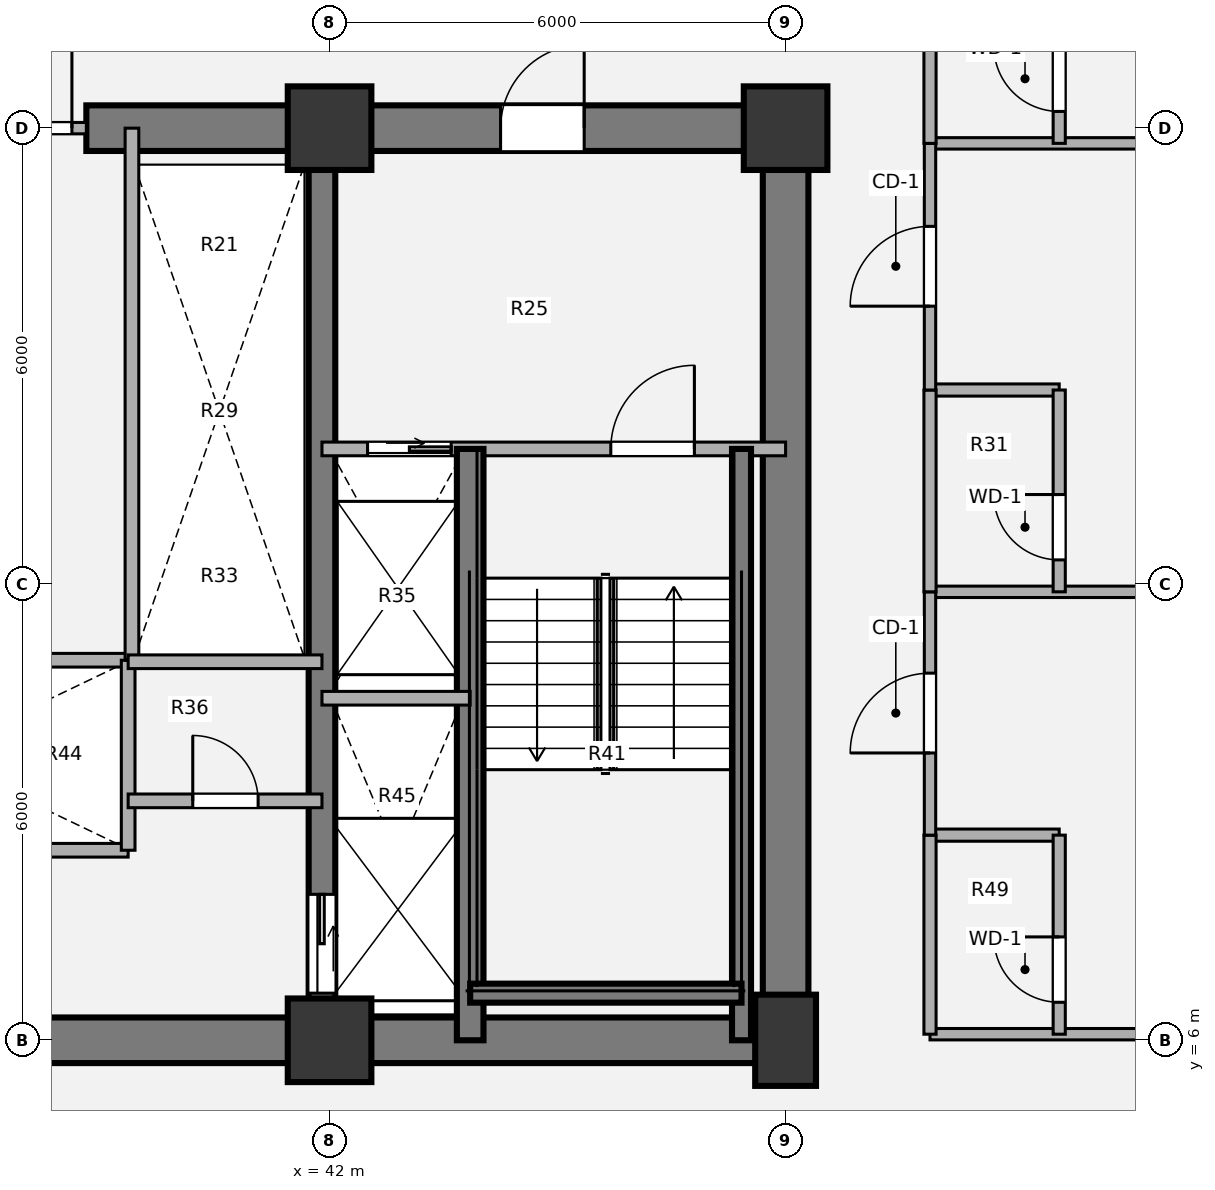
"""IFC4 building model, lengths in metres.
Left out: names, types, materials, properties, quantities, classifications, styles, units other than length and angle.
Written with IfcOpenShell. Run it as: python <this file> out.ifc"""

import sys

from ifc_helpers import new_model, si_unit, direction, frame, frame_2d, origin, origin_2d, place, context, subcontext, project, spatial, rectangle, extrude, source, transform, mapped, element, fill, save


model = new_model("IFC4")
c1 = context("Model", 3, precision=1e-05, world=origin(), true_north=direction((0.0, 1.0)))
c2 = subcontext(c1, "Body", "Model", "MODEL_VIEW")
j1 = project(units=[si_unit("LENGTHUNIT", "METRE"), si_unit("PLANEANGLEUNIT", "RADIAN")], contexts=[c1])
p1 = place(None, origin())
s1 = spatial("IfcSite", under=j1, at=p1, CompositionType="ELEMENT")
p2 = place(p1, origin())
s2 = spatial("IfcBuilding", under=s1, at=p2, CompositionType="ELEMENT")
p3 = place(p2, frame((0.0, 0.0, 42.12)))
s3 = spatial("IfcBuildingStorey", under=s2, at=p3, CompositionType="ELEMENT", Elevation=42.12)
m1 = source(origin(), c2, "Body", "SweptSolid", [
    extrude(rectangle(XDim=1.1, YDim=1.1, at=origin_2d()), origin(), (0.0, 0.0, 1.0), 3.78),
])
p4 = place(p3, frame((42.0, 6.0, 0.0), z_axis=(0.0, 0.0, 1.0), x_axis=(1.0, 0.0, 0.0)))
e1 = element("IfcColumn", 1, at=p4, inside=s3, PredefinedType="COLUMN", context=c2, shape_type="MappedRepresentation", body=[
    mapped(m1, transform((0.0, 0.0, 0.0), x_axis=(1.0, 0.0, 0.0), y_axis=(0.0, 1.0, 0.0), z_axis=(0.0, 0.0, 1.0), scale=1.0)),
])
m2 = source(origin(), c2, "Body", "SweptSolid", [
    extrude(rectangle(XDim=0.8, YDim=1.2, at=origin_2d()), origin(), (0.0, 0.0, 1.0), 3.78),
])
p5 = place(p3, frame((48.0, 6.0, 0.0), z_axis=(0.0, 0.0, 1.0), x_axis=(1.0, 0.0, 0.0)))
e2 = element("IfcColumn", 2, at=p5, inside=s3, PredefinedType="COLUMN", context=c2, shape_type="MappedRepresentation", body=[
    mapped(m2, transform((0.0, 0.0, 0.0), x_axis=(1.0, 0.0, 0.0), y_axis=(0.0, 1.0, 0.0), z_axis=(0.0, 0.0, 1.0), scale=1.0)),
])
for number, where, z_axis, x_axis in (
    (3, (42.0, 18.0, 0.0), (0.0, 0.0, 1.0), (1.0, 0.0, 0.0)),
    (4, (48.0, 18.0, 0.0), (0.0, 0.0, 1.0), (1.0, 0.0, 0.0)),
):
    element("IfcColumn", number, at=place(p3, frame(where, z_axis=z_axis, x_axis=x_axis)), inside=s3, PredefinedType="COLUMN", context=c2, shape_type="MappedRepresentation", body=[
        mapped(m1, transform((0.0, 0.0, 0.0), x_axis=(1.0, 0.0, 0.0), y_axis=(0.0, 1.0, 0.0), z_axis=(0.0, 0.0, 1.0), scale=1.0)),
    ])
p6 = place(p3, frame((48.3, 6.0, 0.0), z_axis=(0.0, 0.0, 1.0), x_axis=(-1.0, 0.0, 0.0)))
e5 = element("IfcWall", 5, at=p6, inside=s3, PredefinedType="SHEAR", context=c2, shape_type="SweptSolid", body=[
    extrude(rectangle(XDim=24.6, YDim=0.6, at=frame_2d((12.3, 0.0))), origin(), (0.0, 0.0, 1.0), 3.78),
])
p7 = place(p3, frame((48.0, 18.0, 0.0), z_axis=(0.0, 0.0, 1.0), x_axis=(0.0, -1.0, 0.0)))
e6 = element("IfcWall", 6, at=p7, inside=s3, PredefinedType="SHEAR", context=c2, shape_type="SweptSolid", body=[
    extrude(rectangle(XDim=12.0, YDim=0.6, at=frame_2d((6.0, 0.0))), origin(), (0.0, 0.0, 1.0), 3.78),
])
p8 = place(p3, frame((38.8, 18.0, 0.0), z_axis=(0.0, 0.0, 1.0), x_axis=(1.0, 0.0, 0.0)))
e7 = element("IfcWall", 7, at=p8, inside=s3, PredefinedType="SHEAR", context=c2, shape_type="SweptSolid", body=[
    extrude(rectangle(XDim=9.5, YDim=0.6, at=frame_2d((4.75, 0.0))), origin(), (0.0, 0.0, 1.0), 3.78),
])
p9 = place(p8, frame((5.45, 0.0, 0.0)))
e8 = element("IfcOpeningElement", 8, at=p9, cuts=e7, PredefinedType="OPENING", context=c2, shape_type="SweptSolid", body=[
    extrude(rectangle(XDim=1.1, YDim=2.1, at=origin_2d()), frame((0.55, 0.31, 1.05), z_axis=(0.0, -1.0, 0.0), x_axis=(1.0, 0.0, 0.0)), (0.0, 0.0, 1.0), 0.62),
])
p10 = place(p3, frame((41.9, 18.0, 0.0), z_axis=(0.0, 0.0, 1.0), x_axis=(0.0, -1.0, 0.0)))
e9 = element("IfcWall", 9, at=p10, inside=s3, PredefinedType="SHEAR", context=c2, shape_type="SweptSolid", body=[
    extrude(rectangle(XDim=12.0, YDim=0.35, at=frame_2d((6.0, 0.0))), origin(), (0.0, 0.0, 1.0), 3.78),
])
p11 = place(p10, frame((10.08, 0.0, 0.0)))
e10 = element("IfcOpeningElement", 10, at=p11, cuts=e9, PredefinedType="OPENING", context=c2, shape_type="SweptSolid", body=[
    extrude(rectangle(XDim=1.3, YDim=2.1, at=origin_2d()), frame((0.65, 0.185, 1.05), z_axis=(0.0, -1.0, 0.0), x_axis=(1.0, 0.0, 0.0)), (0.0, 0.0, 1.0), 0.37),
])
for number, where, z_axis, x_axis in (
    (11, (34.2, 11.0, 0.0), (0.0, 0.0, 1.0), (1.0, 0.0, 0.0)),
    (12, (34.2, 8.5, 0.0), (0.0, 0.0, 1.0), (1.0, 0.0, 0.0)),
):
    element("IfcWall", number, at=place(p3, frame(where, z_axis=z_axis, x_axis=x_axis)), inside=s3, PredefinedType="PARTITIONING", context=c2, shape_type="SweptSolid", body=[
        extrude(rectangle(XDim=5.15, YDim=0.18, at=frame_2d((2.575, 0.0))), origin(), (0.0, 0.0, 1.0), 3.5),
    ])
p12 = place(p3, frame((39.35, 8.5, 0.0), z_axis=(0.0, 0.0, 1.0), x_axis=(0.0, 1.0, 0.0)))
e13 = element("IfcWall", 13, at=p12, inside=s3, PredefinedType="PARTITIONING", context=c2, shape_type="SweptSolid", body=[
    extrude(rectangle(XDim=2.5, YDim=0.18, at=frame_2d((1.25, 0.0))), origin(), (0.0, 0.0, 1.0), 3.5),
])
p13 = place(p3, frame((39.4, 11.0, 0.0), z_axis=(0.0, 0.0, 1.0), x_axis=(0.0, 1.0, 0.0)))
e14 = element("IfcWall", 14, at=p13, inside=s3, PredefinedType="PARTITIONING", context=c2, shape_type="SweptSolid", body=[
    extrude(rectangle(XDim=7.0, YDim=0.18, at=frame_2d((3.5, 0.0))), origin(), (0.0, 0.0, 1.0), 3.5),
])
p14 = place(p3, frame((39.35, 10.98, 0.0), z_axis=(0.0, 0.0, 1.0), x_axis=(1.0, 0.0, 0.0)))
e15 = element("IfcWall", 15, at=p14, inside=s3, PredefinedType="PARTITIONING", context=c2, shape_type="SweptSolid", body=[
    extrude(rectangle(XDim=2.55, YDim=0.18, at=frame_2d((1.275, 0.0))), origin(), (0.0, 0.0, 1.0), 3.5),
])
p15 = place(p3, frame((39.35, 9.15, 0.0), z_axis=(0.0, 0.0, 1.0), x_axis=(1.0, 0.0, 0.0)))
e16 = element("IfcWall", 16, at=p15, inside=s3, PredefinedType="PARTITIONING", context=c2, shape_type="SweptSolid", body=[
    extrude(rectangle(XDim=2.55, YDim=0.18, at=frame_2d((1.275, 0.0))), origin(), (0.0, 0.0, 1.0), 3.5),
])
p16 = place(p15, frame((0.85, 0.0, 0.0)))
e17 = element("IfcOpeningElement", 17, at=p16, cuts=e16, PredefinedType="OPENING", context=c2, shape_type="SweptSolid", body=[
    extrude(rectangle(XDim=0.86, YDim=2.1, at=origin_2d()), frame((0.43, 0.1, 1.05), z_axis=(0.0, -1.0, 0.0), x_axis=(1.0, 0.0, 0.0)), (0.0, 0.0, 1.0), 0.2),
])
p17 = place(p3, frame((33.2, 18.0, 0.0), z_axis=(0.0, 0.0, 1.0), x_axis=(1.0, 0.0, 0.0)))
e18 = element("IfcWall", 18, at=p17, inside=s3, PredefinedType="PARTITIONING", context=c2, shape_type="SweptSolid", body=[
    extrude(rectangle(XDim=5.6, YDim=0.15, at=frame_2d((2.8, 0.0))), origin(), (0.0, 0.0, 1.0), 2.315),
])
p18 = place(p17, frame((0.19, 0.0, 0.0)))
e19 = element("IfcOpeningElement", 19, at=p18, cuts=e18, PredefinedType="OPENING", context=c2, shape_type="SweptSolid", body=[
    extrude(rectangle(XDim=1.1, YDim=2.1, at=origin_2d()), frame((0.55, 0.085, 1.05), z_axis=(0.0, -1.0, 0.0), x_axis=(1.0, 0.0, 0.0)), (0.0, 0.0, 1.0), 0.17),
])
p19 = place(p17, frame((4.31, 0.0, 0.0)))
e20 = element("IfcOpeningElement", 20, at=p19, cuts=e18, PredefinedType="OPENING", context=c2, shape_type="SweptSolid", body=[
    extrude(rectangle(XDim=1.1, YDim=2.1, at=origin_2d()), frame((0.55, 0.085, 1.05), z_axis=(0.0, -1.0, 0.0), x_axis=(1.0, 0.0, 0.0)), (0.0, 0.0, 1.0), 0.17),
])
p20 = place(p3, frame((41.9, 13.78, 0.0), z_axis=(0.0, 0.0, 1.0), x_axis=(1.0, 0.0, 0.0)))
e21 = element("IfcWall", 21, at=p20, inside=s3, PredefinedType="PARTITIONING", context=c2, shape_type="SweptSolid", body=[
    extrude(rectangle(XDim=6.1, YDim=0.18, at=frame_2d((3.05, 0.0))), origin(), (0.0, 0.0, 1.0), 3.5),
])
p21 = place(p20, frame((0.6, 0.0, 0.0)))
e22 = element("IfcOpeningElement", 22, at=p21, cuts=e21, PredefinedType="OPENING", context=c2, shape_type="SweptSolid", body=[
    extrude(rectangle(XDim=1.1, YDim=2.1, at=origin_2d()), frame((0.55, 0.1, 1.05), z_axis=(0.0, -1.0, 0.0), x_axis=(1.0, 0.0, 0.0)), (0.0, 0.0, 1.0), 0.2),
])
p22 = place(p20, frame((3.8, 0.0, 0.0)))
e23 = element("IfcOpeningElement", 23, at=p22, cuts=e21, PredefinedType="OPENING", context=c2, shape_type="SweptSolid", body=[
    extrude(rectangle(XDim=1.1, YDim=2.1, at=origin_2d()), frame((0.55, 0.1, 1.05), z_axis=(0.0, -1.0, 0.0), x_axis=(1.0, 0.0, 0.0)), (0.0, 0.0, 1.0), 0.2),
])
p23 = place(p3, frame((43.85, 6.0, 0.0), z_axis=(0.0, 0.0, 1.0), x_axis=(0.0, 1.0, 0.0)))
e24 = element("IfcWall", 24, at=p23, inside=s3, PredefinedType="SHEAR", context=c2, shape_type="SweptSolid", body=[
    extrude(rectangle(XDim=7.78, YDim=0.35, at=frame_2d((3.89, 0.0))), origin(), (0.0, 0.0, 1.0), 3.85),
])
p24 = place(p3, frame((47.42, 6.0, 0.0), z_axis=(0.0, 0.0, 1.0), x_axis=(0.0, 1.0, 0.0)))
e25 = element("IfcWall", 25, at=p24, inside=s3, PredefinedType="SHEAR", context=c2, shape_type="SweptSolid", body=[
    extrude(rectangle(XDim=7.78, YDim=0.25, at=frame_2d((3.89, 0.0))), origin(), (0.0, 0.0, 1.0), 3.85),
])
p25 = place(p3, frame((43.85, 6.62, 0.0), z_axis=(0.0, 0.0, 1.0), x_axis=(1.0, 0.0, 0.0)))
e26 = element("IfcWall", 26, at=p25, inside=s3, PredefinedType="SHEAR", context=c2, shape_type="SweptSolid", body=[
    extrude(rectangle(XDim=3.57, YDim=0.25, at=frame_2d((1.785, 0.0))), origin(), (0.0, 0.0, 1.0), 3.85),
])
p26 = place(p3, frame((41.9, 10.5, 0.0), z_axis=(0.0, 0.0, 1.0), x_axis=(1.0, 0.0, 0.0)))
e27 = element("IfcWall", 27, at=p26, inside=s3, PredefinedType="PARTITIONING", context=c2, shape_type="SweptSolid", body=[
    extrude(rectangle(XDim=1.95, YDim=0.18, at=frame_2d((0.975, 0.0))), origin(), (0.0, 0.0, 1.0), 3.5),
])
p27 = place(p3, frame((49.9, 6.08, 0.0), z_axis=(0.0, 0.0, 1.0), x_axis=(1.0, 0.0, 0.0)))
e28 = element("IfcWall", 28, at=p27, inside=s3, PredefinedType="PARTITIONING", context=c2, shape_type="SweptSolid", body=[
    extrude(rectangle(XDim=6.2, YDim=0.15, at=frame_2d((3.1, 0.0))), origin(), (0.0, 0.0, 1.0), 3.5),
])
p28 = place(p3, frame((49.9, 8.699, 0.0), z_axis=(0.0, 0.0, 1.0), x_axis=(1.0, 0.0, 0.0)))
e29 = element("IfcWall", 29, at=p28, inside=s3, PredefinedType="PLUMBINGWALL", context=c2, shape_type="SweptSolid", body=[
    extrude(rectangle(XDim=1.7, YDim=0.16, at=frame_2d((0.85, 0.0))), origin(), (0.0, 0.0, 1.0), 3.5),
])
p29 = place(p3, frame((49.9, 11.9, 0.0), z_axis=(0.0, 0.0, 1.0), x_axis=(1.0, 0.0, 0.0)))
e30 = element("IfcWall", 30, at=p29, inside=s3, PredefinedType="PARTITIONING", context=c2, shape_type="SweptSolid", body=[
    extrude(rectangle(XDim=6.2, YDim=0.15, at=frame_2d((3.1, 0.0))), origin(), (0.0, 0.0, 1.0), 3.5),
])
p30 = place(p3, frame((49.9, 14.555, 0.0), z_axis=(0.0, 0.0, 1.0), x_axis=(1.0, 0.0, 0.0)))
e31 = element("IfcWall", 31, at=p30, inside=s3, PredefinedType="PLUMBINGWALL", context=c2, shape_type="SweptSolid", body=[
    extrude(rectangle(XDim=1.7, YDim=0.16, at=frame_2d((0.85, 0.0))), origin(), (0.0, 0.0, 1.0), 3.5),
])
p31 = place(p3, frame((49.9, 17.8, 0.0), z_axis=(0.0, 0.0, 1.0), x_axis=(1.0, 0.0, 0.0)))
e32 = element("IfcWall", 32, at=p31, inside=s3, PredefinedType="PARTITIONING", context=c2, shape_type="SweptSolid", body=[
    extrude(rectangle(XDim=6.2, YDim=0.15, at=frame_2d((3.1, 0.0))), origin(), (0.0, 0.0, 1.0), 3.5),
])
p32 = place(p3, frame((49.9, 6.08, 0.0), z_axis=(0.0, 0.0, 1.0), x_axis=(0.0, 1.0, 0.0)))
e33 = element("IfcWall", 33, at=p32, inside=s3, PredefinedType="PLUMBINGWALL", context=c2, shape_type="SweptSolid", body=[
    extrude(rectangle(XDim=2.619, YDim=0.16, at=frame_2d((1.31, 0.0))), origin(), (0.0, 0.0, 1.0), 3.5),
])
p33 = place(p3, frame((49.9, 8.699, 0.0), z_axis=(0.0, 0.0, 1.0), x_axis=(0.0, 1.0, 0.0)))
e34 = element("IfcWall", 34, at=p33, inside=s3, PredefinedType="PARTITIONING", context=c2, shape_type="SweptSolid", body=[
    extrude(rectangle(XDim=3.201, YDim=0.15, at=frame_2d((1.601, 0.0))), origin(), (0.0, 0.0, 1.0), 3.5),
])
p34 = place(p33, frame((1.081, 0.0, 0.0)))
e35 = element("IfcOpeningElement", 35, at=p34, cuts=e34, PredefinedType="OPENING", context=c2, shape_type="SweptSolid", body=[
    extrude(rectangle(XDim=1.05, YDim=2.1, at=origin_2d()), frame((0.525, 0.085, 1.05), z_axis=(0.0, -1.0, 0.0), x_axis=(1.0, 0.0, 0.0)), (0.0, 0.0, 1.0), 0.17),
])
p35 = place(p3, frame((49.9, 11.9, 0.0), z_axis=(0.0, 0.0, 1.0), x_axis=(0.0, 1.0, 0.0)))
e36 = element("IfcWall", 36, at=p35, inside=s3, PredefinedType="PLUMBINGWALL", context=c2, shape_type="SweptSolid", body=[
    extrude(rectangle(XDim=2.655, YDim=0.16, at=frame_2d((1.328, 0.0))), origin(), (0.0, 0.0, 1.0), 3.5),
])
p36 = place(p3, frame((49.9, 14.555, 0.0), z_axis=(0.0, 0.0, 1.0), x_axis=(0.0, 1.0, 0.0)))
e37 = element("IfcWall", 37, at=p36, inside=s3, PredefinedType="PARTITIONING", context=c2, shape_type="SweptSolid", body=[
    extrude(rectangle(XDim=3.245, YDim=0.15, at=frame_2d((1.623, 0.0))), origin(), (0.0, 0.0, 1.0), 3.5),
])
p37 = place(p36, frame((1.103, 0.0, 0.0)))
e38 = element("IfcOpeningElement", 38, at=p37, cuts=e37, PredefinedType="OPENING", context=c2, shape_type="SweptSolid", body=[
    extrude(rectangle(XDim=1.05, YDim=2.1, at=origin_2d()), frame((0.525, 0.085, 1.05), z_axis=(0.0, -1.0, 0.0), x_axis=(1.0, 0.0, 0.0)), (0.0, 0.0, 1.0), 0.17),
])
p38 = place(p3, frame((49.9, 17.8, 0.0), z_axis=(0.0, 0.0, 1.0), x_axis=(0.0, 1.0, 0.0)))
e39 = element("IfcWall", 39, at=p38, inside=s3, PredefinedType="PLUMBINGWALL", context=c2, shape_type="SweptSolid", body=[
    extrude(rectangle(XDim=2.655, YDim=0.16, at=frame_2d((1.328, 0.0))), origin(), (0.0, 0.0, 1.0), 3.5),
])
p39 = place(p3, frame((51.6, 6.08, 0.0), z_axis=(0.0, 0.0, 1.0), x_axis=(0.0, 1.0, 0.0)))
e40 = element("IfcWall", 40, at=p39, inside=s3, PredefinedType="PLUMBINGWALL", context=c2, shape_type="SweptSolid", body=[
    extrude(rectangle(XDim=2.619, YDim=0.16, at=frame_2d((1.31, 0.0))), origin(), (0.0, 0.0, 1.0), 3.5),
])
p40 = place(p39, frame((0.42, 0.0, 0.0)))
e41 = element("IfcOpeningElement", 41, at=p40, cuts=e40, PredefinedType="OPENING", context=c2, shape_type="SweptSolid", body=[
    extrude(rectangle(XDim=0.86, YDim=2.1, at=origin_2d()), frame((0.43, 0.09, 1.05), z_axis=(0.0, -1.0, 0.0), x_axis=(1.0, 0.0, 0.0)), (0.0, 0.0, 1.0), 0.18),
])
p41 = place(p3, frame((51.6, 11.9, 0.0), z_axis=(0.0, 0.0, 1.0), x_axis=(0.0, 1.0, 0.0)))
e42 = element("IfcWall", 42, at=p41, inside=s3, PredefinedType="PLUMBINGWALL", context=c2, shape_type="SweptSolid", body=[
    extrude(rectangle(XDim=2.655, YDim=0.16, at=frame_2d((1.328, 0.0))), origin(), (0.0, 0.0, 1.0), 3.5),
])
p42 = place(p41, frame((0.42, 0.0, 0.0)))
e43 = element("IfcOpeningElement", 43, at=p42, cuts=e42, PredefinedType="OPENING", context=c2, shape_type="SweptSolid", body=[
    extrude(rectangle(XDim=0.86, YDim=2.1, at=origin_2d()), frame((0.43, 0.09, 1.05), z_axis=(0.0, -1.0, 0.0), x_axis=(1.0, 0.0, 0.0)), (0.0, 0.0, 1.0), 0.18),
])
p43 = place(p3, frame((51.6, 17.8, 0.0), z_axis=(0.0, 0.0, 1.0), x_axis=(0.0, 1.0, 0.0)))
e44 = element("IfcWall", 44, at=p43, inside=s3, PredefinedType="PLUMBINGWALL", context=c2, shape_type="SweptSolid", body=[
    extrude(rectangle(XDim=2.655, YDim=0.16, at=frame_2d((1.328, 0.0))), origin(), (0.0, 0.0, 1.0), 3.5),
])
p44 = place(p43, frame((0.42, 0.0, 0.0)))
e45 = element("IfcOpeningElement", 45, at=p44, cuts=e44, PredefinedType="OPENING", context=c2, shape_type="SweptSolid", body=[
    extrude(rectangle(XDim=0.86, YDim=2.1, at=origin_2d()), frame((0.43, 0.09, 1.05), z_axis=(0.0, -1.0, 0.0), x_axis=(1.0, 0.0, 0.0)), (0.0, 0.0, 1.0), 0.18),
])
m3 = source(origin(), c2, "Body", "SweptSolid", [
    extrude(rectangle(XDim=0.86, YDim=2.1, at=origin_2d()), frame((0.43, 0.025, 1.05), z_axis=(0.0, -1.0, 0.0), x_axis=(1.0, 0.0, 0.0)), (0.0, 0.0, 1.0), 0.05),
])
p45 = place(p16, origin())
e46 = element("IfcDoor", 46, at=p45, inside=s3, OperationType="SINGLE_SWING_LEFT", PredefinedType="DOOR", context=c2, shape_type="MappedRepresentation", body=[
    mapped(m3, transform((0.0, 0.0, 0.0), x_axis=(1.0, 0.0, 0.0), y_axis=(0.0, 1.0, 0.0), z_axis=(0.0, 0.0, 1.0), scale=1.0)),
])
fill(e17, e46)
m4 = source(origin(), c2, "Body", "SweptSolid", [
    extrude(rectangle(XDim=1.1, YDim=2.1, at=origin_2d()), frame((0.55, 0.025, 1.05), z_axis=(0.0, -1.0, 0.0), x_axis=(1.0, 0.0, 0.0)), (0.0, 0.0, 1.0), 0.05),
])
p46 = place(p19, origin())
e47 = element("IfcDoor", 47, at=p46, inside=s3, OperationType="SINGLE_SWING_RIGHT", PredefinedType="DOOR", context=c2, shape_type="MappedRepresentation", body=[
    mapped(m4, transform((0.0, 0.0, 0.0), x_axis=(1.0, 0.0, 0.0), y_axis=(0.0, 1.0, 0.0), z_axis=(0.0, 0.0, 1.0), scale=1.0)),
])
fill(e20, e47)
m5 = source(origin(), c2, "Body", "SweptSolid", [
    extrude(rectangle(XDim=1.1, YDim=2.1, at=origin_2d()), frame((0.55, 0.025, 1.05), z_axis=(0.0, -1.0, 0.0), x_axis=(1.0, 0.0, 0.0)), (0.0, 0.0, 1.0), 0.05),
])
p47 = place(p21, origin())
e48 = element("IfcDoor", 48, at=p47, inside=s3, OperationType="SLIDING_TO_RIGHT", PredefinedType="DOOR", context=c2, shape_type="MappedRepresentation", body=[
    mapped(m5, transform((0.0, 0.0, 0.0), x_axis=(1.0, 0.0, 0.0), y_axis=(0.0, 1.0, 0.0), z_axis=(0.0, 0.0, 1.0), scale=1.0)),
])
fill(e22, e48)
m6 = source(origin(), c2, "Body", "SweptSolid", [
    extrude(rectangle(XDim=1.1, YDim=2.1, at=origin_2d()), frame((0.55, 0.025, 1.05), z_axis=(0.0, -1.0, 0.0), x_axis=(1.0, 0.0, 0.0)), (0.0, 0.0, 1.0), 0.05),
])
p48 = place(p22, origin())
e49 = element("IfcDoor", 49, at=p48, inside=s3, OperationType="SINGLE_SWING_RIGHT", PredefinedType="DOOR", context=c2, shape_type="MappedRepresentation", body=[
    mapped(m6, transform((0.0, 0.0, 0.0), x_axis=(1.0, 0.0, 0.0), y_axis=(0.0, 1.0, 0.0), z_axis=(0.0, 0.0, 1.0), scale=1.0)),
])
fill(e23, e49)
m7 = source(origin(), c2, "Body", "SweptSolid", [
    extrude(rectangle(XDim=1.3, YDim=2.1, at=origin_2d()), frame((0.65, 0.025, 1.05), z_axis=(0.0, -1.0, 0.0), x_axis=(1.0, 0.0, 0.0)), (0.0, 0.0, 1.0), 0.05),
])
p49 = place(p11, origin())
e50 = element("IfcDoor", 50, at=p49, inside=s3, OperationType="SLIDING_TO_LEFT", PredefinedType="DOOR", context=c2, shape_type="MappedRepresentation", body=[
    mapped(m7, transform((0.0, 0.0, 0.0), x_axis=(1.0, 0.0, 0.0), y_axis=(0.0, 1.0, 0.0), z_axis=(0.0, 0.0, 1.0), scale=1.0)),
])
fill(e10, e50)
p50 = place(p9, origin())
e51 = element("IfcDoor", 51, at=p50, inside=s3, OperationType="SINGLE_SWING_RIGHT", PredefinedType="DOOR", context=c2, shape_type="MappedRepresentation", body=[
    mapped(m4, transform((0.0, 0.0, 0.0), x_axis=(1.0, 0.0, 0.0), y_axis=(0.0, 1.0, 0.0), z_axis=(0.0, 0.0, 1.0), scale=1.0)),
])
fill(e8, e51)
m8 = source(origin(), c2, "Body", "SweptSolid", [
    extrude(rectangle(XDim=1.05, YDim=2.1, at=origin_2d()), frame((0.525, 0.025, 1.05), z_axis=(0.0, -1.0, 0.0), x_axis=(1.0, 0.0, 0.0)), (0.0, 0.0, 1.0), 0.05),
])
p51 = place(p34, origin())
e52 = element("IfcDoor", 52, at=p51, inside=s3, OperationType="SINGLE_SWING_LEFT", PredefinedType="DOOR", context=c2, shape_type="MappedRepresentation", body=[
    mapped(m8, transform((0.0, 0.0, 0.0), x_axis=(1.0, 0.0, 0.0), y_axis=(0.0, 1.0, 0.0), z_axis=(0.0, 0.0, 1.0), scale=1.0)),
])
fill(e35, e52)
p52 = place(p37, origin())
e53 = element("IfcDoor", 53, at=p52, inside=s3, OperationType="SINGLE_SWING_LEFT", PredefinedType="DOOR", context=c2, shape_type="MappedRepresentation", body=[
    mapped(m8, transform((0.0, 0.0, 0.0), x_axis=(1.0, 0.0, 0.0), y_axis=(0.0, 1.0, 0.0), z_axis=(0.0, 0.0, 1.0), scale=1.0)),
])
fill(e38, e53)
m9 = source(origin(), c2, "Body", "SweptSolid", [
    extrude(rectangle(XDim=0.86, YDim=2.1, at=origin_2d()), frame((0.43, 0.025, 1.05), z_axis=(0.0, -1.0, 0.0), x_axis=(1.0, 0.0, 0.0)), (0.0, 0.0, 1.0), 0.05),
])
p53 = place(p40, origin())
e54 = element("IfcDoor", 54, at=p53, inside=s3, OperationType="SINGLE_SWING_RIGHT", PredefinedType="DOOR", context=c2, shape_type="MappedRepresentation", body=[
    mapped(m9, transform((0.0, 0.0, 0.0), x_axis=(1.0, 0.0, 0.0), y_axis=(0.0, 1.0, 0.0), z_axis=(0.0, 0.0, 1.0), scale=1.0)),
])
fill(e41, e54)
p54 = place(p42, origin())
e55 = element("IfcDoor", 55, at=p54, inside=s3, OperationType="SINGLE_SWING_RIGHT", PredefinedType="DOOR", context=c2, shape_type="MappedRepresentation", body=[
    mapped(m9, transform((0.0, 0.0, 0.0), x_axis=(1.0, 0.0, 0.0), y_axis=(0.0, 1.0, 0.0), z_axis=(0.0, 0.0, 1.0), scale=1.0)),
])
fill(e43, e55)
p55 = place(p44, origin())
e56 = element("IfcDoor", 56, at=p55, inside=s3, OperationType="SINGLE_SWING_RIGHT", PredefinedType="DOOR", context=c2, shape_type="MappedRepresentation", body=[
    mapped(m9, transform((0.0, 0.0, 0.0), x_axis=(1.0, 0.0, 0.0), y_axis=(0.0, 1.0, 0.0), z_axis=(0.0, 0.0, 1.0), scale=1.0)),
])
fill(e45, e56)
save(model, sys.argv[1])
